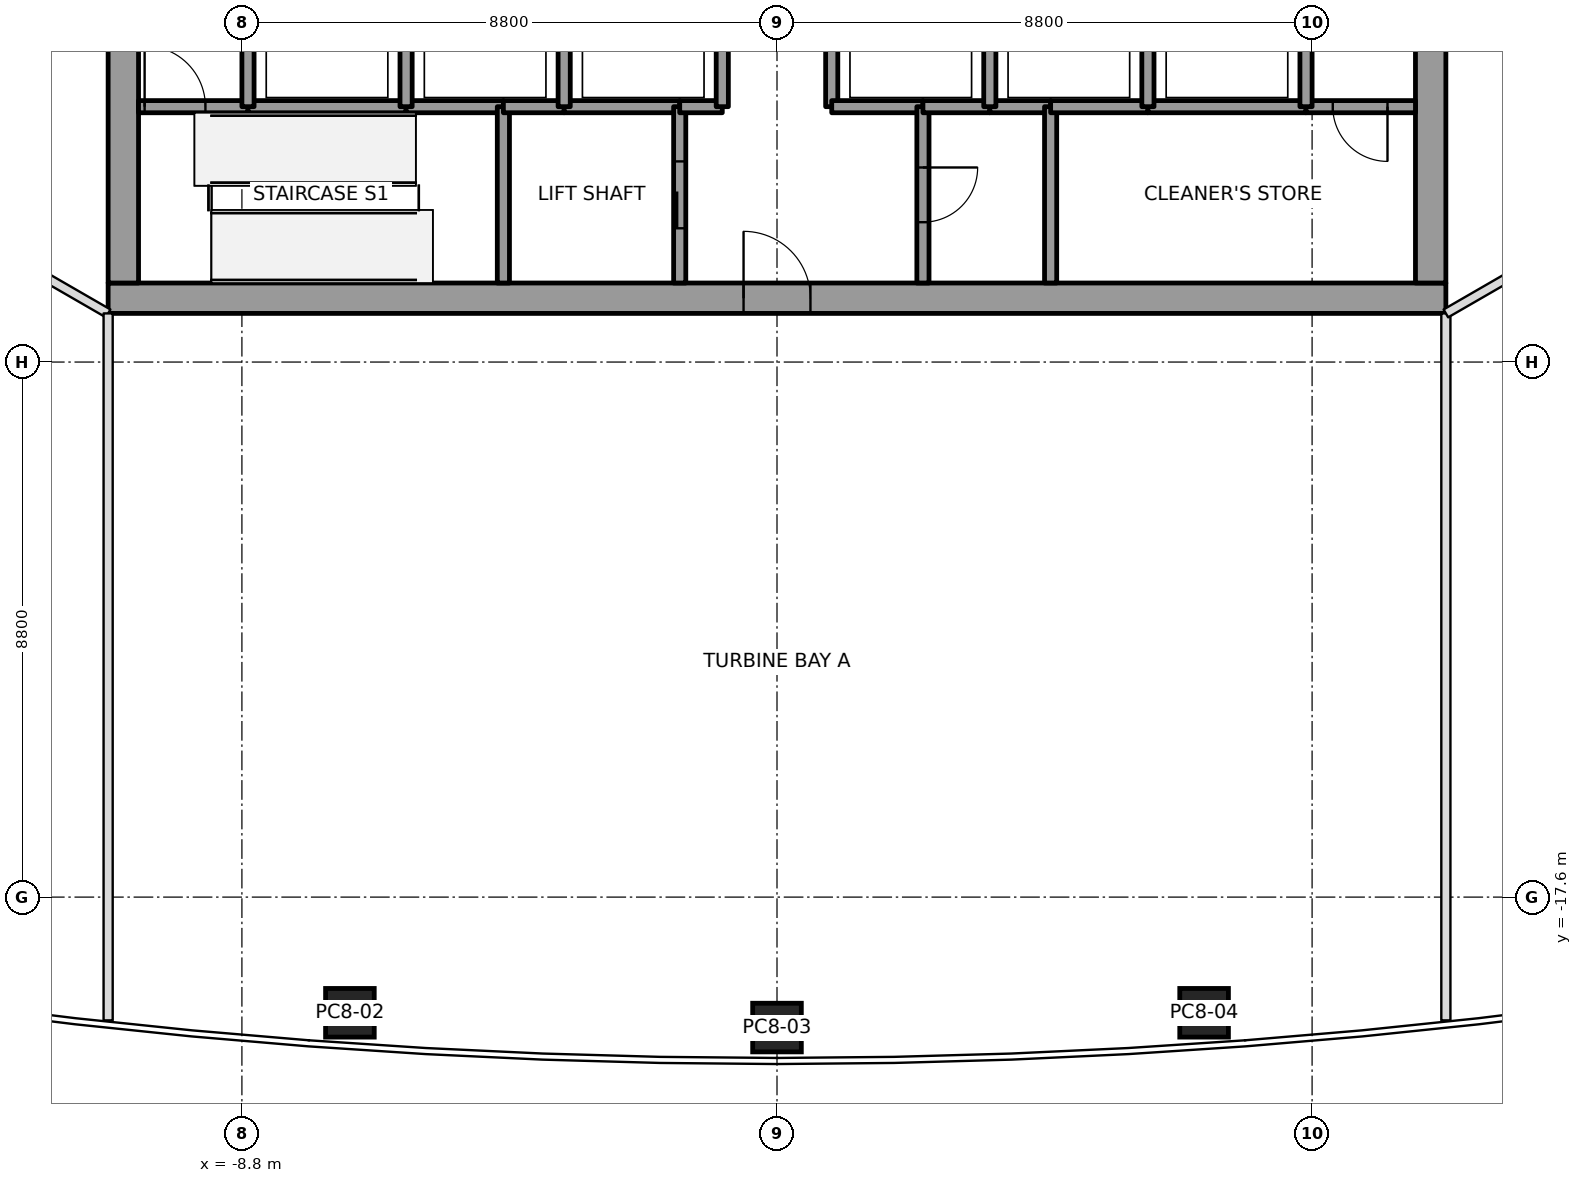
"""IFC4 building model, lengths in metres.
Left out: names, types, materials, properties, quantities, classifications, styles, units other than length and angle.
Written with IfcOpenShell. Run it as: python <this file> out.ifc"""

import sys

from ifc_helpers import new_model, si_unit, direction, frame, frame_2d, origin, origin_2d, place, context, subcontext, project, spatial, rectangle, extrude, clip, halfspace, element, fill, save


model = new_model("IFC4")
c1 = context("Model", 3, precision=1e-05, world=origin(), true_north=direction((0.0, 1.0)))
c2 = subcontext(c1, "Body", "Model", "MODEL_VIEW")
j1 = project(units=[si_unit("LENGTHUNIT", "METRE"), si_unit("PLANEANGLEUNIT", "RADIAN")], contexts=[c1])
p1 = place(None, origin())
s1 = spatial("IfcSite", under=j1, at=p1, CompositionType="ELEMENT")
p2 = place(p1, origin())
s2 = spatial("IfcBuilding", under=s1, at=p2, CompositionType="ELEMENT")
p3 = place(p2, frame((0.0, 0.0, 330.4)))
s3 = spatial("IfcBuildingStorey", under=s2, at=p3, CompositionType="ELEMENT", Elevation=330.4)
p4 = place(p3, frame((-7.024, -19.503, 0.0), z_axis=(0.003879046283, 0.004964094195, 0.999980155187), x_axis=(-0.997599573797, 0.069156735942, 0.00352650435)))
e1 = element("IfcColumn", 1, at=p4, inside=s3, PredefinedType="COLUMN", context=c2, shape_type="SweptSolid", body=[
    clip(clip(extrude(rectangle(XDim=0.8, YDim=0.8, at=origin_2d()), origin(), (0.0, 0.0, 1.0), 9.0), halfspace(frame((0.0, 0.0, 0.001)), True)), halfspace(frame((0.0, 0.0, 8.998)), False)),
])
p5 = place(p3, frame((0.0, -19.746, 0.0), z_axis=(0.0, 0.005072634388, 0.999987134107), x_axis=(1.0, 0.0, 0.0)))
e2 = element("IfcColumn", 2, at=p5, inside=s3, PredefinedType="COLUMN", context=c2, shape_type="SweptSolid", body=[
    clip(clip(extrude(rectangle(XDim=0.8, YDim=0.8, at=origin_2d()), origin(), (0.0, 0.0, 1.0), 9.0), halfspace(frame((0.0, 0.0, 0.001)), True)), halfspace(frame((0.0, 0.0, 8.999)), False)),
])
p6 = place(p3, frame((7.024, -19.503, 0.0), z_axis=(-0.003879046283, 0.004964094195, 0.999980155187), x_axis=(0.997599573797, 0.069156735942, 0.00352650435)))
e3 = element("IfcColumn", 3, at=p6, inside=s3, PredefinedType="COLUMN", context=c2, shape_type="SweptSolid", body=[
    clip(clip(extrude(rectangle(XDim=0.8, YDim=0.8, at=origin_2d()), origin(), (0.0, 0.0, 1.0), 9.0), halfspace(frame((0.0, 0.0, 0.001)), True)), halfspace(frame((0.0, 0.0, 8.998)), False)),
])
p7 = place(p3, frame((-11.0, -7.75, 0.0), z_axis=(0.0, 0.0, 1.0), x_axis=(1.0, 0.0, 0.0)))
e4 = element("IfcWall", 4, at=p7, inside=s3, PredefinedType="SHEAR", context=c2, shape_type="SweptSolid", body=[
    extrude(rectangle(XDim=22.0, YDim=0.5, at=frame_2d((11.0, 0.0))), origin(), (0.0, 0.0, 1.0), 9.0),
])
p8 = place(p7, frame((10.45, 0.0, 0.0)))
e5 = element("IfcOpeningElement", 5, at=p8, cuts=e4, PredefinedType="OPENING", context=c2, shape_type="SweptSolid", body=[
    extrude(rectangle(XDim=1.1, YDim=2.1, at=frame_2d((0.55, 1.05))), frame((0.0, 0.25, 0.0), z_axis=(0.0, -1.0, 0.0), x_axis=(1.0, 0.0, 0.0)), (0.0, 0.0, 1.0), 0.5),
])
p9 = place(p3, frame((-10.75, -7.5, 0.0), z_axis=(0.0, 0.0, 1.0), x_axis=(0.0, 1.0, 0.0)))
e6 = element("IfcWall", 6, at=p9, inside=s3, PredefinedType="SHEAR", context=c2, shape_type="SweptSolid", body=[
    extrude(rectangle(XDim=15.0, YDim=0.5, at=frame_2d((7.5, 0.0))), origin(), (0.0, 0.0, 1.0), 9.0),
])
p10 = place(p9, frame((6.6, 0.0, 0.0)))
e7 = element("IfcOpeningElement", 7, at=p10, cuts=e6, PredefinedType="OPENING", context=c2, shape_type="SweptSolid", body=[
    extrude(rectangle(XDim=1.8, YDim=2.1, at=frame_2d((0.9, 1.05))), frame((0.0, 0.25, 0.0), z_axis=(0.0, -1.0, 0.0), x_axis=(1.0, 0.0, 0.0)), (0.0, 0.0, 1.0), 0.5),
])
p11 = place(p3, frame((10.75, -7.5, 0.0), z_axis=(0.0, 0.0, 1.0), x_axis=(0.0, 1.0, 0.0)))
e8 = element("IfcWall", 8, at=p11, inside=s3, PredefinedType="SHEAR", context=c2, shape_type="SweptSolid", body=[
    extrude(rectangle(XDim=15.0, YDim=0.5, at=frame_2d((7.5, 0.0))), origin(), (0.0, 0.0, 1.0), 9.0),
])
p12 = place(p11, frame((6.6, 0.0, 0.0)))
e9 = element("IfcOpeningElement", 9, at=p12, cuts=e8, PredefinedType="OPENING", context=c2, shape_type="SweptSolid", body=[
    extrude(rectangle(XDim=1.8, YDim=2.1, at=frame_2d((0.9, 1.05))), frame((0.0, 0.25, 0.0), z_axis=(0.0, -1.0, 0.0), x_axis=(1.0, 0.0, 0.0)), (0.0, 0.0, 1.0), 0.5),
])
p13 = place(p3, frame((-10.5, -4.6, 0.0), z_axis=(0.0, 0.0, 1.0), x_axis=(1.0, 0.0, 0.0)))
e10 = element("IfcWall", 10, at=p13, inside=s3, PredefinedType="SOLIDWALL", context=c2, shape_type="SweptSolid", body=[
    extrude(rectangle(XDim=1.8, YDim=0.2, at=frame_2d((0.9, 0.0))), origin(), (0.0, 0.0, 1.0), 8.85),
])
p14 = place(p13, frame((0.1, 0.0, 0.0)))
e11 = element("IfcOpeningElement", 11, at=p14, cuts=e10, PredefinedType="OPENING", context=c2, shape_type="SweptSolid", body=[
    extrude(rectangle(XDim=1.0, YDim=2.1, at=frame_2d((0.5, 1.05))), frame((0.0, 0.1, 0.0), z_axis=(0.0, -1.0, 0.0), x_axis=(1.0, 0.0, 0.0)), (0.0, 0.0, 1.0), 0.2),
])
p15 = place(p3, frame((-8.7, -4.6, 0.0), z_axis=(0.0, 0.0, 1.0), x_axis=(1.0, 0.0, 0.0)))
e12 = element("IfcWall", 12, at=p15, inside=s3, PredefinedType="SOLIDWALL", context=c2, shape_type="SweptSolid", body=[
    extrude(rectangle(XDim=2.6, YDim=0.2, at=frame_2d((1.3, 0.0))), origin(), (0.0, 0.0, 1.0), 8.85),
])
p16 = place(p3, frame((-8.7, -4.6, 0.0), z_axis=(0.0, 0.0, 1.0), x_axis=(0.0, 1.0, 0.0)))
e13 = element("IfcWall", 13, at=p16, inside=s3, PredefinedType="SOLIDWALL", context=c2, shape_type="SweptSolid", body=[
    extrude(rectangle(XDim=2.8, YDim=0.2, at=frame_2d((1.4, 0.0))), origin(), (0.0, 0.0, 1.0), 8.85),
])
p17 = place(p3, frame((-6.1, -4.6, 0.0), z_axis=(0.0, 0.0, 1.0), x_axis=(1.0, 0.0, 0.0)))
e14 = element("IfcWall", 14, at=p17, inside=s3, PredefinedType="SOLIDWALL", context=c2, shape_type="SweptSolid", body=[
    extrude(rectangle(XDim=1.6, YDim=0.2, at=frame_2d((0.8, 0.0))), origin(), (0.0, 0.0, 1.0), 8.85),
])
p18 = place(p3, frame((-6.1, -4.6, 0.0), z_axis=(0.0, 0.0, 1.0), x_axis=(0.0, 1.0, 0.0)))
e15 = element("IfcWall", 15, at=p18, inside=s3, PredefinedType="SOLIDWALL", context=c2, shape_type="SweptSolid", body=[
    extrude(rectangle(XDim=2.8, YDim=0.2, at=frame_2d((1.4, 0.0))), origin(), (0.0, 0.0, 1.0), 8.85),
])
p19 = place(p3, frame((-4.5, -4.6, 0.0), z_axis=(0.0, 0.0, 1.0), x_axis=(0.0, -1.0, 0.0)))
e16 = element("IfcWall", 16, at=p19, inside=s3, PredefinedType="SOLIDWALL", context=c2, shape_type="SweptSolid", body=[
    extrude(rectangle(XDim=2.9, YDim=0.2, at=frame_2d((1.45, 0.0))), origin(), (0.0, 0.0, 1.0), 8.85),
])
p20 = place(p3, frame((-4.5, -4.6, 0.0), z_axis=(0.0, 0.0, 1.0), x_axis=(1.0, 0.0, 0.0)))
e17 = element("IfcWall", 17, at=p20, inside=s3, PredefinedType="SOLIDWALL", context=c2, shape_type="SweptSolid", body=[
    extrude(rectangle(XDim=1.0, YDim=0.2, at=frame_2d((0.5, 0.0))), origin(), (0.0, 0.0, 1.0), 8.85),
])
p21 = place(p3, frame((-3.5, -4.6, 0.0), z_axis=(0.0, 0.0, 1.0), x_axis=(1.0, 0.0, 0.0)))
e18 = element("IfcWall", 18, at=p21, inside=s3, PredefinedType="SOLIDWALL", context=c2, shape_type="SweptSolid", body=[
    extrude(rectangle(XDim=1.9, YDim=0.2, at=frame_2d((0.95, 0.0))), origin(), (0.0, 0.0, 1.0), 8.85),
])
p22 = place(p3, frame((-3.5, -4.6, 0.0), z_axis=(0.0, 0.0, 1.0), x_axis=(0.0, 1.0, 0.0)))
e19 = element("IfcWall", 19, at=p22, inside=s3, PredefinedType="SOLIDWALL", context=c2, shape_type="SweptSolid", body=[
    extrude(rectangle(XDim=2.8, YDim=0.2, at=frame_2d((1.4, 0.0))), origin(), (0.0, 0.0, 1.0), 8.85),
])
p23 = place(p3, frame((-1.6, -7.5, 0.0), z_axis=(0.0, 0.0, 1.0), x_axis=(0.0, 1.0, 0.0)))
e20 = element("IfcWall", 20, at=p23, inside=s3, PredefinedType="SOLIDWALL", context=c2, shape_type="SweptSolid", body=[
    extrude(rectangle(XDim=2.9, YDim=0.2, at=frame_2d((1.45, 0.0))), origin(), (0.0, 0.0, 1.0), 8.85),
])
p24 = place(p23, frame((0.9, 0.0, 0.0)))
e21 = element("IfcOpeningElement", 21, at=p24, cuts=e20, PredefinedType="OPENING", context=c2, shape_type="SweptSolid", body=[
    extrude(rectangle(XDim=1.1, YDim=2.1, at=frame_2d((0.55, 1.05))), frame((0.0, 0.1, 0.0), z_axis=(0.0, -1.0, 0.0), x_axis=(1.0, 0.0, 0.0)), (0.0, 0.0, 1.0), 0.2),
])
p25 = place(p3, frame((-1.6, -4.6, 0.0), z_axis=(0.0, 0.0, 1.0), x_axis=(1.0, 0.0, 0.0)))
e22 = element("IfcWall", 22, at=p25, inside=s3, PredefinedType="SOLIDWALL", context=c2, shape_type="SweptSolid", body=[
    extrude(rectangle(XDim=0.7, YDim=0.2, at=frame_2d((0.35, 0.0))), origin(), (0.0, 0.0, 1.0), 8.85),
])
for number, where, z_axis, x_axis in (
    (23, (-0.9, -4.6, 0.0), (0.0, 0.0, 1.0), (0.0, 1.0, 0.0)),
    (24, (0.9, -1.8, 0.0), (0.0, 0.0, 1.0), (0.0, -1.0, 0.0)),
):
    element("IfcWall", number, at=place(p3, frame(where, z_axis=z_axis, x_axis=x_axis)), inside=s3, PredefinedType="SOLIDWALL", context=c2, shape_type="SweptSolid", body=[
        extrude(rectangle(XDim=2.8, YDim=0.2, at=frame_2d((1.4, 0.0))), origin(), (0.0, 0.0, 1.0), 8.85),
    ])
p26 = place(p3, frame((0.9, -4.6, 0.0), z_axis=(0.0, 0.0, 1.0), x_axis=(1.0, 0.0, 0.0)))
e25 = element("IfcWall", 25, at=p26, inside=s3, PredefinedType="SOLIDWALL", context=c2, shape_type="SweptSolid", body=[
    extrude(rectangle(XDim=1.5, YDim=0.2, at=frame_2d((0.75, 0.0))), origin(), (0.0, 0.0, 1.0), 8.85),
])
p27 = place(p3, frame((2.4, -4.6, 0.0), z_axis=(0.0, 0.0, 1.0), x_axis=(0.0, -1.0, 0.0)))
e26 = element("IfcWall", 26, at=p27, inside=s3, PredefinedType="SOLIDWALL", context=c2, shape_type="SweptSolid", body=[
    extrude(rectangle(XDim=2.9, YDim=0.2, at=frame_2d((1.45, 0.0))), origin(), (0.0, 0.0, 1.0), 8.85),
])
p28 = place(p27, frame((1.0, 0.0, 0.0)))
e27 = element("IfcOpeningElement", 27, at=p28, cuts=e26, PredefinedType="OPENING", context=c2, shape_type="SweptSolid", body=[
    extrude(rectangle(XDim=0.9, YDim=2.1, at=frame_2d((0.45, 1.05))), frame((0.0, 0.1, 0.0), z_axis=(0.0, -1.0, 0.0), x_axis=(1.0, 0.0, 0.0)), (0.0, 0.0, 1.0), 0.2),
])
p29 = place(p3, frame((3.5, -4.6, 0.0), z_axis=(0.0, 0.0, 1.0), x_axis=(-1.0, 0.0, 0.0)))
e28 = element("IfcWall", 28, at=p29, inside=s3, PredefinedType="SOLIDWALL", context=c2, shape_type="SweptSolid", body=[
    extrude(rectangle(XDim=1.1, YDim=0.2, at=frame_2d((0.55, 0.0))), origin(), (0.0, 0.0, 1.0), 8.85),
])
p30 = place(p3, frame((4.5, -4.6, 0.0), z_axis=(0.0, 0.0, 1.0), x_axis=(-1.0, 0.0, 0.0)))
e29 = element("IfcWall", 29, at=p30, inside=s3, PredefinedType="SOLIDWALL", context=c2, shape_type="SweptSolid", body=[
    extrude(rectangle(XDim=1.0, YDim=0.2, at=frame_2d((0.5, 0.0))), origin(), (0.0, 0.0, 1.0), 8.85),
])
p31 = place(p3, frame((3.5, -4.6, 0.0), z_axis=(0.0, 0.0, 1.0), x_axis=(0.0, 1.0, 0.0)))
e30 = element("IfcWall", 30, at=p31, inside=s3, PredefinedType="SOLIDWALL", context=c2, shape_type="SweptSolid", body=[
    extrude(rectangle(XDim=2.8, YDim=0.2, at=frame_2d((1.4, 0.0))), origin(), (0.0, 0.0, 1.0), 8.85),
])
p32 = place(p3, frame((4.5, -4.6, 0.0), z_axis=(0.0, 0.0, 1.0), x_axis=(0.0, -1.0, 0.0)))
e31 = element("IfcWall", 31, at=p32, inside=s3, PredefinedType="SOLIDWALL", context=c2, shape_type="SweptSolid", body=[
    extrude(rectangle(XDim=2.9, YDim=0.2, at=frame_2d((1.45, 0.0))), origin(), (0.0, 0.0, 1.0), 8.85),
])
p33 = place(p3, frame((6.1, -4.6, 0.0), z_axis=(0.0, 0.0, 1.0), x_axis=(-1.0, 0.0, 0.0)))
e32 = element("IfcWall", 32, at=p33, inside=s3, PredefinedType="SOLIDWALL", context=c2, shape_type="SweptSolid", body=[
    extrude(rectangle(XDim=1.6, YDim=0.2, at=frame_2d((0.8, 0.0))), origin(), (0.0, 0.0, 1.0), 8.85),
])
p34 = place(p3, frame((8.7, -4.6, 0.0), z_axis=(0.0, 0.0, 1.0), x_axis=(-1.0, 0.0, 0.0)))
e33 = element("IfcWall", 33, at=p34, inside=s3, PredefinedType="SOLIDWALL", context=c2, shape_type="SweptSolid", body=[
    extrude(rectangle(XDim=2.6, YDim=0.2, at=frame_2d((1.3, 0.0))), origin(), (0.0, 0.0, 1.0), 8.85),
])
p35 = place(p3, frame((6.1, -4.6, 0.0), z_axis=(0.0, 0.0, 1.0), x_axis=(0.0, 1.0, 0.0)))
e34 = element("IfcWall", 34, at=p35, inside=s3, PredefinedType="SOLIDWALL", context=c2, shape_type="SweptSolid", body=[
    extrude(rectangle(XDim=2.8, YDim=0.2, at=frame_2d((1.4, 0.0))), origin(), (0.0, 0.0, 1.0), 8.85),
])
p36 = place(p3, frame((10.5, -4.6, 0.0), z_axis=(0.0, 0.0, 1.0), x_axis=(-1.0, 0.0, 0.0)))
e35 = element("IfcWall", 35, at=p36, inside=s3, PredefinedType="SOLIDWALL", context=c2, shape_type="SweptSolid", body=[
    extrude(rectangle(XDim=1.8, YDim=0.2, at=frame_2d((0.9, 0.0))), origin(), (0.0, 0.0, 1.0), 8.85),
])
p37 = place(p36, frame((0.46, 0.0, 0.0)))
e36 = element("IfcOpeningElement", 36, at=p37, cuts=e35, PredefinedType="OPENING", context=c2, shape_type="SweptSolid", body=[
    extrude(rectangle(XDim=0.9, YDim=2.1, at=frame_2d((0.45, 1.05))), frame((0.0, 0.1, 0.0), z_axis=(0.0, -1.0, 0.0), x_axis=(1.0, 0.0, 0.0)), (0.0, 0.0, 1.0), 0.2),
])
p38 = place(p3, frame((8.7, -1.8, 0.0), z_axis=(0.0, 0.0, 1.0), x_axis=(0.0, -1.0, 0.0)))
e37 = element("IfcWall", 37, at=p38, inside=s3, PredefinedType="SOLIDWALL", context=c2, shape_type="SweptSolid", body=[
    extrude(rectangle(XDim=2.8, YDim=0.2, at=frame_2d((1.4, 0.0))), origin(), (0.0, 0.0, 1.0), 8.85),
])
p39 = place(p3, frame((-23.068, -1.032, 0.0), z_axis=(0.0, 0.0, 1.0), x_axis=(0.866022206254, -0.500005538244, 0.0)))
e38 = element("IfcWall", 38, at=p39, inside=s3, PredefinedType="PARTITIONING", context=c2, shape_type="SweptSolid", body=[
    extrude(rectangle(XDim=13.935, YDim=0.15, at=frame_2d((6.968, 0.0))), origin(), (0.0, 0.0, 1.0), 8.083),
])
p40 = place(p39, frame((9.053, 0.0, 0.0)))
e39 = element("IfcOpeningElement", 39, at=p40, cuts=e38, PredefinedType="OPENING", context=c2, shape_type="SweptSolid", body=[
    extrude(rectangle(XDim=1.5, YDim=2.1, at=frame_2d((0.75, 1.05))), frame((0.0, 0.075, 0.0), z_axis=(0.0, -1.0, 0.0), x_axis=(1.0, 0.0, 0.0)), (0.0, 0.0, 1.0), 0.15),
])
for number, where, z_axis, x_axis in (
    (40, (-11.0, -8.0, 0.0), (0.0, 0.0, 1.0), (0.0, -1.0, 0.0)),
    (41, (11.0, -19.628, 0.0), (0.0, 0.0, 1.0), (0.0, 1.0, 0.0)),
):
    element("IfcWall", number, at=place(p3, frame(where, z_axis=z_axis, x_axis=x_axis)), inside=s3, PredefinedType="PARTITIONING", context=c2, shape_type="SweptSolid", body=[
        extrude(rectangle(XDim=11.628, YDim=0.15, at=frame_2d((5.814, 0.0))), origin(), (0.0, 0.0, 1.0), 8.083),
    ])
p41 = place(p3, frame((11.0, -8.0, 0.0), z_axis=(0.0, 0.0, 1.0), x_axis=(0.866022206254, 0.500005538244, 0.0)))
e42 = element("IfcWall", 42, at=p41, inside=s3, PredefinedType="PARTITIONING", context=c2, shape_type="SweptSolid", body=[
    extrude(rectangle(XDim=13.935, YDim=0.15, at=frame_2d((6.968, 0.0))), origin(), (0.0, 0.0, 1.0), 8.083),
])
p42 = place(p41, frame((3.632, 0.0, 0.0)))
e43 = element("IfcOpeningElement", 43, at=p42, cuts=e42, PredefinedType="OPENING", context=c2, shape_type="SweptSolid", body=[
    extrude(rectangle(XDim=1.0, YDim=2.1, at=frame_2d((0.5, 1.05))), frame((0.0, 0.075, 0.0), z_axis=(0.0, -1.0, 0.0), x_axis=(1.0, 0.0, 0.0)), (0.0, 0.0, 1.0), 0.15),
])
p43 = place(p24, origin())
e44 = element("IfcDoor", 44, at=p43, inside=s3, OperationType="SLIDING_TO_LEFT", PredefinedType="DOOR", context=c2, shape_type="SweptSolid", body=[
    extrude(rectangle(XDim=1.1, YDim=2.1, at=frame_2d((0.55, 1.05))), frame((0.0, 0.025, 0.0), z_axis=(0.0, -1.0, 0.0), x_axis=(1.0, 0.0, 0.0)), (0.0, 0.0, 1.0), 0.05),
])
fill(e21, e44)
p44 = place(p14, origin())
e45 = element("IfcDoor", 45, at=p44, inside=s3, OperationType="SINGLE_SWING_LEFT", PredefinedType="DOOR", context=c2, shape_type="SweptSolid", body=[
    extrude(rectangle(XDim=1.0, YDim=2.1, at=frame_2d((0.5, 1.05))), frame((0.0, 0.025, 0.0), z_axis=(0.0, -1.0, 0.0), x_axis=(1.0, 0.0, 0.0)), (0.0, 0.0, 1.0), 0.05),
])
fill(e11, e45)
p45 = place(p37, origin())
e46 = element("IfcDoor", 46, at=p45, inside=s3, OperationType="SINGLE_SWING_LEFT", PredefinedType="DOOR", context=c2, shape_type="SweptSolid", body=[
    extrude(rectangle(XDim=0.9, YDim=2.1, at=frame_2d((0.45, 1.05))), frame((0.0, 0.025, 0.0), z_axis=(0.0, -1.0, 0.0), x_axis=(1.0, 0.0, 0.0)), (0.0, 0.0, 1.0), 0.05),
])
fill(e36, e46)
p46 = place(p28, origin())
e47 = element("IfcDoor", 47, at=p46, inside=s3, OperationType="SINGLE_SWING_LEFT", PredefinedType="DOOR", context=c2, shape_type="SweptSolid", body=[
    extrude(rectangle(XDim=0.9, YDim=2.1, at=frame_2d((0.45, 1.05))), frame((0.0, 0.025, 0.0), z_axis=(0.0, -1.0, 0.0), x_axis=(1.0, 0.0, 0.0)), (0.0, 0.0, 1.0), 0.05),
])
fill(e27, e47)
p47 = place(p8, origin())
e48 = element("IfcDoor", 48, at=p47, inside=s3, OperationType="SINGLE_SWING_RIGHT", PredefinedType="DOOR", context=c2, shape_type="SweptSolid", body=[
    extrude(rectangle(XDim=1.1, YDim=2.1, at=frame_2d((0.55, 1.05))), frame((0.0, 0.025, 0.0), z_axis=(0.0, -1.0, 0.0), x_axis=(1.0, 0.0, 0.0)), (0.0, 0.0, 1.0), 0.05),
])
fill(e5, e48)
save(model, sys.argv[1])
